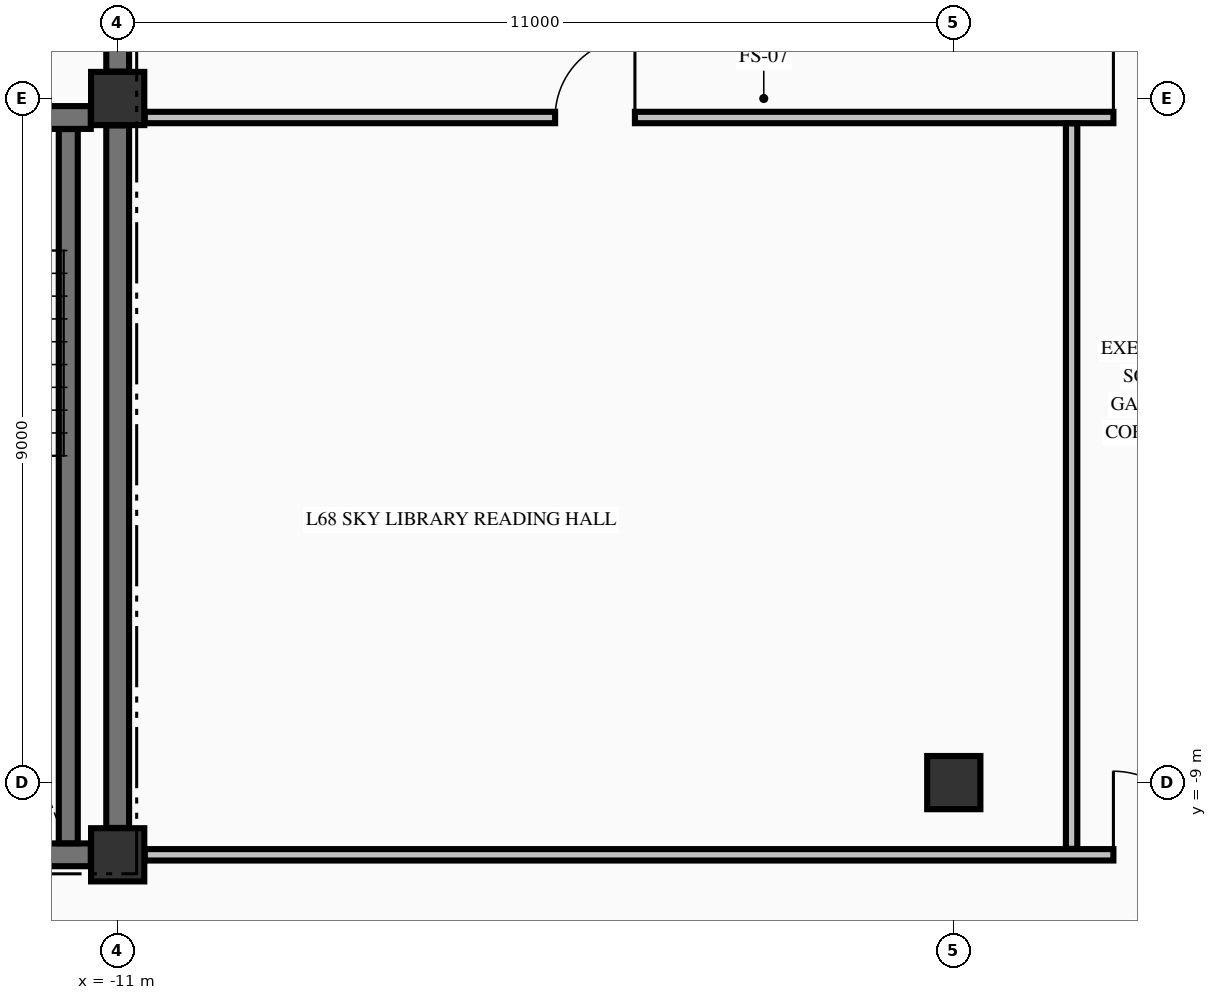
"""IFC4 building model, lengths in metres.
Left out: names, types, materials, properties, quantities, classifications, styles, units other than length and angle.
Written with IfcOpenShell. Run it as: python <this file> out.ifc"""

import sys

from ifc_helpers import new_model, si_unit, direction, frame, frame_2d, origin, origin_2d, place, context, subcontext, project, spatial, rectangle, extrude, element, fill, save


model = new_model("IFC4")
c1 = context("Model", 3, precision=1e-05, world=origin(), true_north=direction((0.0, 1.0)))
c2 = subcontext(c1, "Body", "Model", "MODEL_VIEW")
j1 = project(units=[si_unit("LENGTHUNIT", "METRE"), si_unit("PLANEANGLEUNIT", "RADIAN")], contexts=[c1])
p1 = place(None, origin())
s1 = spatial("IfcSite", under=j1, at=p1, CompositionType="ELEMENT")
p2 = place(p1, origin())
s2 = spatial("IfcBuilding", under=s1, at=p2, CompositionType="ELEMENT")
p3 = place(p2, frame((0.0, 0.0, 257.66)))
s3 = spatial("IfcBuildingStorey", under=s2, at=p3, CompositionType="ELEMENT", Elevation=257.66)
for number, where, z_axis, x_axis in (
    (1, (-11.0, -9.95, -0.25), (0.0, 0.0, 1.0), (1.0, 0.0, 0.0)),
    (2, (-11.0, 0.0, -0.25), (0.0, 0.0, 1.0), (1.0, 0.0, 0.0)),
    (3, (0.0, -9.0, -0.25), (0.0, 0.0, 1.0), (1.0, 0.0, 0.0)),
):
    element("IfcColumn", number, at=place(p3, frame(where, z_axis=z_axis, x_axis=x_axis)), inside=s3, PredefinedType="COLUMN", context=c2, shape_type="SweptSolid", body=[
        extrude(rectangle(XDim=0.7, YDim=0.7, at=origin_2d()), origin(), (0.0, 0.0, 1.0), 3.23),
    ])
p4 = place(p3, frame((-14.7, -9.95, 0.0), z_axis=(0.0, 0.0, 1.0), x_axis=(1.0, 0.0, 0.0)))
e4 = element("IfcWall", 4, at=p4, inside=s3, PredefinedType="SHEAR", context=c2, shape_type="SweptSolid", body=[
    extrude(rectangle(XDim=3.346, YDim=0.3, at=frame_2d((1.673, 0.0))), origin(), (0.0, 0.0, 1.0), 2.98),
])
p5 = place(p3, frame((-19.646, -0.25, 0.0), z_axis=(0.0, 0.0, 1.0), x_axis=(1.0, 0.0, 0.0)))
e5 = element("IfcWall", 5, at=p5, inside=s3, PredefinedType="SHEAR", context=c2, shape_type="SweptSolid", body=[
    extrude(rectangle(XDim=8.292, YDim=0.3, at=frame_2d((4.146, 0.0))), origin(), (0.0, 0.0, 1.0), 2.98),
])
p6 = place(p5, frame((5.946, 0.0, 0.0)))
e6 = element("IfcOpeningElement", 6, at=p6, cuts=e5, PredefinedType="OPENING", context=c2, shape_type="SweptSolid", body=[
    extrude(rectangle(XDim=1.1, YDim=2.15, at=frame_2d((0.55, 1.075))), frame((0.0, 0.16, 0.0), z_axis=(0.0, -1.0, 0.0), x_axis=(1.0, 0.0, 0.0)), (0.0, 0.0, 1.0), 0.32),
])
p7 = place(p3, frame((-10.644, -9.95, 0.0), z_axis=(0.0, 0.0, 1.0), x_axis=(1.0, 0.0, 0.0)))
e7 = element("IfcWall", 7, at=p7, inside=s3, PredefinedType="PARTITIONING", context=c2, shape_type="SweptSolid", body=[
    extrude(rectangle(XDim=21.288, YDim=0.15, at=frame_2d((10.644, 0.0))), origin(), (0.0, 0.0, 1.0), 2.98),
])
p8 = place(p7, frame((12.744, 0.0, 0.0)))
e8 = element("IfcOpeningElement", 8, at=p8, cuts=e7, PredefinedType="OPENING", context=c2, shape_type="SweptSolid", body=[
    extrude(rectangle(XDim=1.1, YDim=2.15, at=frame_2d((0.55, 1.075))), frame((0.0, 0.085, 0.0), z_axis=(0.0, -1.0, 0.0), x_axis=(1.0, 0.0, 0.0)), (0.0, 0.0, 1.0), 0.17),
])
p9 = place(p7, frame((18.949, 0.0, 0.0)))
e9 = element("IfcOpeningElement", 9, at=p9, cuts=e7, PredefinedType="OPENING", context=c2, shape_type="SweptSolid", body=[
    extrude(rectangle(XDim=0.95, YDim=2.15, at=frame_2d((0.475, 1.075))), frame((0.0, 0.085, 0.0), z_axis=(0.0, -1.0, 0.0), x_axis=(1.0, 0.0, 0.0)), (0.0, 0.0, 1.0), 0.17),
])
p10 = place(p3, frame((-10.644, -0.25, 0.0), z_axis=(0.0, 0.0, 1.0), x_axis=(1.0, 0.0, 0.0)))
e10 = element("IfcWall", 10, at=p10, inside=s3, PredefinedType="PARTITIONING", context=c2, shape_type="SweptSolid", body=[
    extrude(rectangle(XDim=21.288, YDim=0.15, at=frame_2d((10.644, 0.0))), origin(), (0.0, 0.0, 1.0), 2.98),
])
p11 = place(p10, frame((12.744, 0.0, 0.0)))
e11 = element("IfcOpeningElement", 11, at=p11, cuts=e10, PredefinedType="OPENING", context=c2, shape_type="SweptSolid", body=[
    extrude(rectangle(XDim=1.1, YDim=2.15, at=frame_2d((0.55, 1.075))), frame((0.0, 0.085, 0.0), z_axis=(0.0, -1.0, 0.0), x_axis=(1.0, 0.0, 0.0)), (0.0, 0.0, 1.0), 0.17),
])
p12 = place(p10, frame((5.399, 0.0, 0.0)))
e12 = element("IfcOpeningElement", 12, at=p12, cuts=e10, PredefinedType="OPENING", context=c2, shape_type="SweptSolid", body=[
    extrude(rectangle(XDim=1.05, YDim=2.15, at=frame_2d((0.525, 1.075))), frame((0.0, 0.085, 0.0), z_axis=(0.0, -1.0, 0.0), x_axis=(1.0, 0.0, 0.0)), (0.0, 0.0, 1.0), 0.17),
])
p13 = place(p10, frame((17.549, 0.0, 0.0)))
e13 = element("IfcOpeningElement", 13, at=p13, cuts=e10, PredefinedType="OPENING", context=c2, shape_type="SweptSolid", body=[
    extrude(rectangle(XDim=0.95, YDim=2.15, at=frame_2d((0.475, 1.075))), frame((0.0, 0.085, 0.0), z_axis=(0.0, -1.0, 0.0), x_axis=(1.0, 0.0, 0.0)), (0.0, 0.0, 1.0), 0.17),
])
p14 = place(p3, frame((-11.65, -9.798, 0.0), z_axis=(0.0, 0.0, 1.0), x_axis=(0.0, 1.0, 0.0)))
e14 = element("IfcWall", 14, at=p14, inside=s3, PredefinedType="SOLIDWALL", context=c2, shape_type="SweptSolid", body=[
    extrude(rectangle(XDim=9.396, YDim=0.25, at=frame_2d((4.698, 0.0))), origin(), (0.0, 0.0, 1.0), 2.98),
])
p15 = place(p3, frame((-11.0, -9.596, 0.0), z_axis=(0.0, 0.0, 1.0), x_axis=(0.0, 1.0, 0.0)))
e15 = element("IfcWall", 15, at=p15, inside=s3, PredefinedType="SHEAR", context=c2, shape_type="SweptSolid", body=[
    extrude(rectangle(XDim=9.242, YDim=0.3, at=frame_2d((4.621, 0.0))), origin(), (0.0, 0.0, 1.0), 2.98),
])
p16 = place(p3, frame((-11.0, 0.354, 0.0), z_axis=(0.0, 0.0, 1.0), x_axis=(0.0, 1.0, 0.0)))
e16 = element("IfcWall", 16, at=p16, inside=s3, PredefinedType="SHEAR", context=c2, shape_type="SweptSolid", body=[
    extrude(rectangle(XDim=2.394, YDim=0.3, at=frame_2d((1.197, 0.0))), origin(), (0.0, 0.0, 1.0), 2.98),
])
p17 = place(p16, frame((0.746, 0.0, 0.0)))
e17 = element("IfcOpeningElement", 17, at=p17, cuts=e16, PredefinedType="OPENING", context=c2, shape_type="SweptSolid", body=[
    extrude(rectangle(XDim=1.1, YDim=2.15, at=frame_2d((0.55, 1.075))), frame((0.0, 0.16, 0.0), z_axis=(0.0, -1.0, 0.0), x_axis=(1.0, 0.0, 0.0)), (0.0, 0.0, 1.0), 0.32),
])
p18 = place(p3, frame((1.55, -9.872, 0.0), z_axis=(0.0, 0.0, 1.0), x_axis=(0.0, 1.0, 0.0)))
e18 = element("IfcWall", 18, at=p18, inside=s3, PredefinedType="PARTITIONING", context=c2, shape_type="SweptSolid", body=[
    extrude(rectangle(XDim=9.544, YDim=0.15, at=frame_2d((4.772, 0.0))), origin(), (0.0, 0.0, 1.0), 2.98),
])
p19 = place(p8, origin())
e19 = element("IfcDoor", 19, at=p19, inside=s3, OperationType="SINGLE_SWING_LEFT", PredefinedType="DOOR", context=c2, shape_type="SweptSolid", body=[
    extrude(rectangle(XDim=1.1, YDim=2.15, at=frame_2d((0.55, 1.075))), frame((0.0, 0.025, 0.0), z_axis=(0.0, -1.0, 0.0), x_axis=(1.0, 0.0, 0.0)), (0.0, 0.0, 1.0), 0.05),
])
fill(e8, e19)
p20 = place(p11, origin())
e20 = element("IfcDoor", 20, at=p20, inside=s3, OperationType="SINGLE_SWING_LEFT", PredefinedType="DOOR", context=c2, shape_type="SweptSolid", body=[
    extrude(rectangle(XDim=1.1, YDim=2.15, at=frame_2d((0.55, 1.075))), frame((0.0, 0.025, 0.0), z_axis=(0.0, -1.0, 0.0), x_axis=(1.0, 0.0, 0.0)), (0.0, 0.0, 1.0), 0.05),
])
fill(e11, e20)
p21 = place(p12, origin())
e21 = element("IfcDoor", 21, at=p21, inside=s3, OperationType="SINGLE_SWING_RIGHT", PredefinedType="DOOR", context=c2, shape_type="SweptSolid", body=[
    extrude(rectangle(XDim=1.05, YDim=2.15, at=frame_2d((0.525, 1.075))), frame((0.0, 0.025, 0.0), z_axis=(0.0, -1.0, 0.0), x_axis=(1.0, 0.0, 0.0)), (0.0, 0.0, 1.0), 0.05),
])
fill(e12, e21)
save(model, sys.argv[1])
